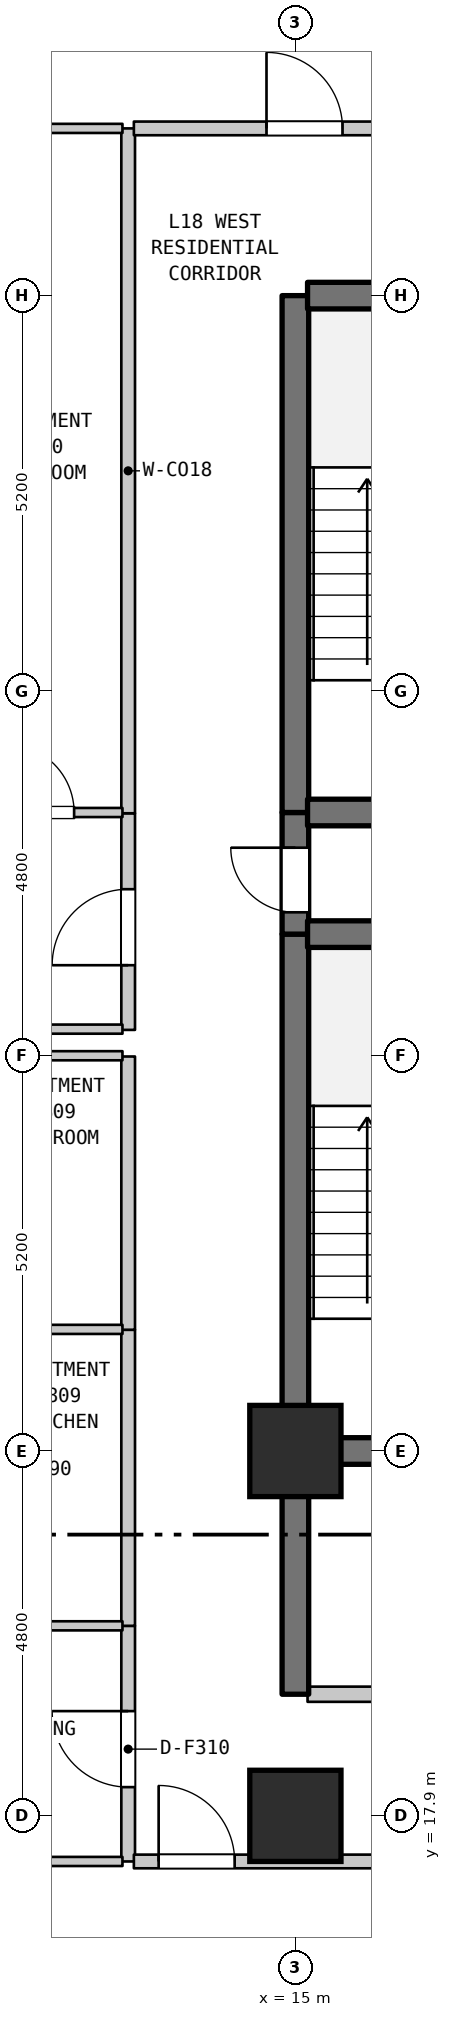
"""IFC4 building model, lengths in metres.
Left out: names, types, materials, properties, quantities, classifications, styles, units other than length and angle.
Written with IfcOpenShell. Run it as: python <this file> out.ifc"""

import sys

from ifc_helpers import new_model, si_unit, direction, frame, frame_2d, origin, origin_2d, place, context, subcontext, project, spatial, rectangle, extrude, element, fill, save


model = new_model("IFC4")
c1 = context("Model", 3, precision=1e-05, world=origin(), true_north=direction((0.0, 1.0)))
c2 = subcontext(c1, "Body", "Model", "MODEL_VIEW")
j1 = project(units=[si_unit("LENGTHUNIT", "METRE"), si_unit("PLANEANGLEUNIT", "RADIAN")], contexts=[c1])
p1 = place(None, origin())
s1 = spatial("IfcSite", under=j1, at=p1, CompositionType="ELEMENT")
p2 = place(p1, origin())
s2 = spatial("IfcBuilding", under=s1, at=p2, CompositionType="ELEMENT")
p3 = place(p2, frame((0.0, 0.0, 77.5)))
s3 = spatial("IfcBuildingStorey", under=s2, at=p3, CompositionType="ELEMENT", Elevation=77.5)
for number, where, z_axis, x_axis in (
    (1, (15.0, 17.9, 0.0), (0.0, 0.0, 1.0), (1.0, 0.0, 0.0)),
    (2, (15.0, 22.7, 0.0), (0.0, 0.0, 1.0), (1.0, 0.0, 0.0)),
):
    element("IfcColumn", number, at=place(p3, frame(where, z_axis=z_axis, x_axis=x_axis)), inside=s3, PredefinedType="COLUMN", context=c2, shape_type="SweptSolid", body=[
        extrude(rectangle(XDim=1.2, YDim=1.2, at=origin_2d()), origin(), (0.0, 0.0, 1.0), 3.7),
    ])
p4 = place(p3, frame((12.8, 17.3, 0.0), z_axis=(0.0, 0.0, 1.0), x_axis=(0.0, 1.0, 0.0)))
e3 = element("IfcWall", 3, at=p4, inside=s3, PredefinedType="STANDARD", context=c2, shape_type="SweptSolid", body=[
    extrude(rectangle(XDim=3.1, YDim=0.18, at=frame_2d((1.55, 0.0))), origin(), (0.0, 0.0, 1.0), 3.28),
])
p5 = place(p4, frame((0.978, 0.0, 0.0)))
e4 = element("IfcOpeningElement", 4, at=p5, cuts=e3, PredefinedType="OPENING", context=c2, shape_type="SweptSolid", body=[
    extrude(rectangle(XDim=1.0, YDim=2.15, at=frame_2d((0.5, 1.075))), frame((0.0, 0.1, 0.0), z_axis=(0.0, -1.0, 0.0), x_axis=(1.0, 0.0, 0.0)), (0.0, 0.0, 1.0), 0.2),
])
p6 = place(p3, frame((12.8, 20.4, 0.0), z_axis=(0.0, 0.0, 1.0), x_axis=(0.0, 1.0, 0.0)))
e5 = element("IfcWall", 5, at=p6, inside=s3, PredefinedType="STANDARD", context=c2, shape_type="SweptSolid", body=[
    extrude(rectangle(XDim=3.895, YDim=0.18, at=frame_2d((1.948, 0.0))), origin(), (0.0, 0.0, 1.0), 3.28),
])
p7 = place(p3, frame((12.8, 24.295, 0.0), z_axis=(0.0, 0.0, 1.0), x_axis=(0.0, 1.0, 0.0)))
e6 = element("IfcWall", 6, at=p7, inside=s3, PredefinedType="STANDARD", context=c2, shape_type="SweptSolid", body=[
    extrude(rectangle(XDim=3.595, YDim=0.18, at=frame_2d((1.797, 0.0))), origin(), (0.0, 0.0, 1.0), 3.28),
])
p8 = place(p3, frame((12.8, 28.24, 0.0), z_axis=(0.0, 0.0, 1.0), x_axis=(0.0, 1.0, 0.0)))
e7 = element("IfcWall", 7, at=p8, inside=s3, PredefinedType="STANDARD", context=c2, shape_type="SweptSolid", body=[
    extrude(rectangle(XDim=2.85, YDim=0.18, at=frame_2d((1.425, 0.0))), origin(), (0.0, 0.0, 1.0), 3.28),
])
p9 = place(p8, frame((0.851, 0.0, 0.0)))
e8 = element("IfcOpeningElement", 8, at=p9, cuts=e7, PredefinedType="OPENING", context=c2, shape_type="SweptSolid", body=[
    extrude(rectangle(XDim=1.0, YDim=2.15, at=frame_2d((0.5, 1.075))), frame((0.0, 0.1, 0.0), z_axis=(0.0, -1.0, 0.0), x_axis=(1.0, 0.0, 0.0)), (0.0, 0.0, 1.0), 0.2),
])
p10 = place(p3, frame((12.8, 31.09, 0.0), z_axis=(0.0, 0.0, 1.0), x_axis=(0.0, 1.0, 0.0)))
e9 = element("IfcWall", 9, at=p10, inside=s3, PredefinedType="STANDARD", context=c2, shape_type="SweptSolid", body=[
    extrude(rectangle(XDim=9.01, YDim=0.18, at=frame_2d((4.505, 0.0))), origin(), (0.0, 0.0, 1.0), 3.28),
])
p11 = place(p3, frame((15.0, 19.5, 0.0), z_axis=(0.0, 0.0, 1.0), x_axis=(0.0, 1.0, 0.0)))
e10 = element("IfcWall", 10, at=p11, inside=s3, PredefinedType="SHEAR", context=c2, shape_type="SweptSolid", body=[
    extrude(rectangle(XDim=3.2, YDim=0.35, at=frame_2d((1.6, 0.0))), origin(), (0.0, 0.0, 1.0), 3.28),
])
p12 = place(p3, frame((15.0, 22.7, 0.0), z_axis=(0.0, 0.0, 1.0), x_axis=(0.0, 1.0, 0.0)))
e11 = element("IfcWall", 11, at=p12, inside=s3, PredefinedType="SHEAR", context=c2, shape_type="SweptSolid", body=[
    extrude(rectangle(XDim=6.8, YDim=0.35, at=frame_2d((3.4, 0.0))), origin(), (0.0, 0.0, 1.0), 3.28),
])
p13 = place(p3, frame((15.0, 29.5, 0.0), z_axis=(0.0, 0.0, 1.0), x_axis=(0.0, 1.0, 0.0)))
e12 = element("IfcWall", 12, at=p13, inside=s3, PredefinedType="SHEAR", context=c2, shape_type="SweptSolid", body=[
    extrude(rectangle(XDim=1.6, YDim=0.35, at=frame_2d((0.8, 0.0))), origin(), (0.0, 0.0, 1.0), 3.28),
])
p14 = place(p13, frame((0.287, 0.0, 0.0)))
e13 = element("IfcOpeningElement", 13, at=p14, cuts=e12, PredefinedType="OPENING", context=c2, shape_type="SweptSolid", body=[
    extrude(rectangle(XDim=0.85, YDim=2.1, at=frame_2d((0.425, 1.05))), frame((0.0, 0.185, 0.0), z_axis=(0.0, -1.0, 0.0), x_axis=(1.0, 0.0, 0.0)), (0.0, 0.0, 1.0), 0.37),
])
p15 = place(p3, frame((15.0, 31.1, 0.0), z_axis=(0.0, 0.0, 1.0), x_axis=(0.0, 1.0, 0.0)))
e14 = element("IfcWall", 14, at=p15, inside=s3, PredefinedType="SHEAR", context=c2, shape_type="SweptSolid", body=[
    extrude(rectangle(XDim=6.8, YDim=0.35, at=frame_2d((3.4, 0.0))), origin(), (0.0, 0.0, 1.0), 3.28),
])
p16 = place(p3, frame((9.085, 17.3, 0.0), z_axis=(0.0, 0.0, 1.0), x_axis=(1.0, 0.0, 0.0)))
e15 = element("IfcWall", 15, at=p16, inside=s3, PredefinedType="PARTITIONING", context=c2, shape_type="SweptSolid", body=[
    extrude(rectangle(XDim=3.64, YDim=0.12, at=frame_2d((1.82, 0.0))), origin(), (0.0, 0.0, 1.0), 3.28),
])
p17 = place(p3, frame((12.875, 17.3, 0.0), z_axis=(0.0, 0.0, 1.0), x_axis=(1.0, 0.0, 0.0)))
e16 = element("IfcWall", 16, at=p17, inside=s3, PredefinedType="STANDARD", context=c2, shape_type="SweptSolid", body=[
    extrude(rectangle(XDim=3.28, YDim=0.18, at=frame_2d((1.64, 0.0))), origin(), (0.0, 0.0, 1.0), 3.28),
])
p18 = place(p17, frame((0.326, 0.0, 0.0)))
e17 = element("IfcOpeningElement", 17, at=p18, cuts=e16, PredefinedType="OPENING", context=c2, shape_type="SweptSolid", body=[
    extrude(rectangle(XDim=1.0, YDim=2.15, at=frame_2d((0.5, 1.075))), frame((0.0, 0.1, 0.0), z_axis=(0.0, -1.0, 0.0), x_axis=(1.0, 0.0, 0.0)), (0.0, 0.0, 1.0), 0.2),
])
p19 = place(p3, frame((15.16, 19.5, 0.0), z_axis=(0.0, 0.0, 1.0), x_axis=(1.0, 0.0, 0.0)))
e18 = element("IfcWall", 18, at=p19, inside=s3, PredefinedType="STANDARD", context=c2, shape_type="SweptSolid", body=[
    extrude(rectangle(XDim=3.68, YDim=0.2, at=frame_2d((1.84, 0.0))), origin(), (0.0, 0.0, 1.0), 3.28),
])
p20 = place(p19, frame((1.39, 0.0, 0.0)))
e19 = element("IfcOpeningElement", 19, at=p20, cuts=e18, PredefinedType="OPENING", context=c2, shape_type="SweptSolid", body=[
    extrude(rectangle(XDim=0.9, YDim=2.15, at=frame_2d((0.45, 1.075))), frame((0.0, 0.11, 0.0), z_axis=(0.0, -1.0, 0.0), x_axis=(1.0, 0.0, 0.0)), (0.0, 0.0, 1.0), 0.22),
])
p21 = place(p3, frame((10.595, 20.4, 0.0), z_axis=(0.0, 0.0, 1.0), x_axis=(1.0, 0.0, 0.0)))
e20 = element("IfcWall", 20, at=p21, inside=s3, PredefinedType="PARTITIONING", context=c2, shape_type="SweptSolid", body=[
    extrude(rectangle(XDim=2.13, YDim=0.12, at=frame_2d((1.065, 0.0))), origin(), (0.0, 0.0, 1.0), 3.28),
])
p22 = place(p3, frame((15.16, 22.7, 0.0), z_axis=(0.0, 0.0, 1.0), x_axis=(1.0, 0.0, 0.0)))
e21 = element("IfcWall", 21, at=p22, inside=s3, PredefinedType="SHEAR", context=c2, shape_type="SweptSolid", body=[
    extrude(rectangle(XDim=3.68, YDim=0.35, at=frame_2d((1.84, 0.0))), origin(), (0.0, 0.0, 1.0), 3.28),
])
for number, where, z_axis, x_axis in (
    (22, (10.595, 24.3, 0.0), (0.0, 0.0, 1.0), (1.0, 0.0, 0.0)),
    (23, (10.595, 27.9, 0.0), (0.0, 0.0, 1.0), (1.0, 0.0, 0.0)),
):
    element("IfcWall", number, at=place(p3, frame(where, z_axis=z_axis, x_axis=x_axis)), inside=s3, PredefinedType="PARTITIONING", context=c2, shape_type="SweptSolid", body=[
        extrude(rectangle(XDim=2.13, YDim=0.12, at=frame_2d((1.065, 0.0))), origin(), (0.0, 0.0, 1.0), 3.28),
    ])
p23 = place(p3, frame((9.03, 28.25, 0.0), z_axis=(0.0, 0.0, 1.0), x_axis=(1.0, 0.0, 0.0)))
e24 = element("IfcWall", 24, at=p23, inside=s3, PredefinedType="PARTITIONING", context=c2, shape_type="SweptSolid", body=[
    extrude(rectangle(XDim=3.695, YDim=0.12, at=frame_2d((1.848, 0.0))), origin(), (0.0, 0.0, 1.0), 3.28),
])
p24 = place(p3, frame((15.16, 29.5, 0.0), z_axis=(0.0, 0.0, 1.0), x_axis=(1.0, 0.0, 0.0)))
e25 = element("IfcWall", 25, at=p24, inside=s3, PredefinedType="SHEAR", context=c2, shape_type="SweptSolid", body=[
    extrude(rectangle(XDim=3.68, YDim=0.35, at=frame_2d((1.84, 0.0))), origin(), (0.0, 0.0, 1.0), 3.28),
])
p25 = place(p3, frame((10.523, 31.1, 0.0), z_axis=(0.0, 0.0, 1.0), x_axis=(1.0, 0.0, 0.0)))
e26 = element("IfcWall", 26, at=p25, inside=s3, PredefinedType="PARTITIONING", context=c2, shape_type="SweptSolid", body=[
    extrude(rectangle(XDim=2.202, YDim=0.12, at=frame_2d((1.101, 0.0))), origin(), (0.0, 0.0, 1.0), 3.28),
])
p26 = place(p25, frame((0.666, 0.0, 0.0)))
e27 = element("IfcOpeningElement", 27, at=p26, cuts=e26, PredefinedType="OPENING", context=c2, shape_type="SweptSolid", body=[
    extrude(rectangle(XDim=0.9, YDim=2.1, at=frame_2d((0.45, 1.05))), frame((0.0, 0.07, 0.0), z_axis=(0.0, -1.0, 0.0), x_axis=(1.0, 0.0, 0.0)), (0.0, 0.0, 1.0), 0.14),
])
for number, where, z_axis, x_axis in (
    (28, (15.16, 31.1, 0.0), (0.0, 0.0, 1.0), (1.0, 0.0, 0.0)),
    (29, (15.16, 37.9, 0.0), (0.0, 0.0, 1.0), (1.0, 0.0, 0.0)),
):
    element("IfcWall", number, at=place(p3, frame(where, z_axis=z_axis, x_axis=x_axis)), inside=s3, PredefinedType="SHEAR", context=c2, shape_type="SweptSolid", body=[
        extrude(rectangle(XDim=3.68, YDim=0.35, at=frame_2d((1.84, 0.0))), origin(), (0.0, 0.0, 1.0), 3.28),
    ])
p27 = place(p3, frame((10.523, 40.1, 0.0), z_axis=(0.0, 0.0, 1.0), x_axis=(1.0, 0.0, 0.0)))
e30 = element("IfcWall", 30, at=p27, inside=s3, PredefinedType="PARTITIONING", context=c2, shape_type="SweptSolid", body=[
    extrude(rectangle(XDim=2.202, YDim=0.12, at=frame_2d((1.101, 0.0))), origin(), (0.0, 0.0, 1.0), 3.28),
])
p28 = place(p3, frame((12.875, 40.1, 0.0), z_axis=(0.0, 0.0, 1.0), x_axis=(1.0, 0.0, 0.0)))
e31 = element("IfcWall", 31, at=p28, inside=s3, PredefinedType="STANDARD", context=c2, shape_type="SweptSolid", body=[
    extrude(rectangle(XDim=4.52, YDim=0.18, at=frame_2d((2.26, 0.0))), origin(), (0.0, 0.0, 1.0), 3.28),
])
p29 = place(p28, frame((1.745, 0.0, 0.0)))
e32 = element("IfcOpeningElement", 32, at=p29, cuts=e31, PredefinedType="OPENING", context=c2, shape_type="SweptSolid", body=[
    extrude(rectangle(XDim=1.0, YDim=2.15, at=frame_2d((0.5, 1.075))), frame((0.0, 0.1, 0.0), z_axis=(0.0, -1.0, 0.0), x_axis=(1.0, 0.0, 0.0)), (0.0, 0.0, 1.0), 0.2),
])
p30 = place(p5, origin())
e33 = element("IfcDoor", 33, at=p30, inside=s3, OperationType="SINGLE_SWING_RIGHT", PredefinedType="DOOR", context=c2, shape_type="SweptSolid", body=[
    extrude(rectangle(XDim=1.0, YDim=2.15, at=frame_2d((0.5, 1.075))), frame((0.0, 0.025, 0.0), z_axis=(0.0, -1.0, 0.0), x_axis=(1.0, 0.0, 0.0)), (0.0, 0.0, 1.0), 0.05),
])
fill(e4, e33)
p31 = place(p9, origin())
e34 = element("IfcDoor", 34, at=p31, inside=s3, OperationType="SINGLE_SWING_LEFT", PredefinedType="DOOR", context=c2, shape_type="SweptSolid", body=[
    extrude(rectangle(XDim=1.0, YDim=2.15, at=frame_2d((0.5, 1.075))), frame((0.0, 0.025, 0.0), z_axis=(0.0, -1.0, 0.0), x_axis=(1.0, 0.0, 0.0)), (0.0, 0.0, 1.0), 0.05),
])
fill(e8, e34)
p32 = place(p14, origin())
e35 = element("IfcDoor", 35, at=p32, inside=s3, OperationType="SINGLE_SWING_RIGHT", PredefinedType="DOOR", context=c2, shape_type="SweptSolid", body=[
    extrude(rectangle(XDim=0.85, YDim=2.1, at=frame_2d((0.425, 1.05))), frame((0.0, 0.025, 0.0), z_axis=(0.0, -1.0, 0.0), x_axis=(1.0, 0.0, 0.0)), (0.0, 0.0, 1.0), 0.05),
])
fill(e13, e35)
p33 = place(p18, origin())
e36 = element("IfcDoor", 36, at=p33, inside=s3, OperationType="SINGLE_SWING_LEFT", PredefinedType="DOOR", context=c2, shape_type="SweptSolid", body=[
    extrude(rectangle(XDim=1.0, YDim=2.15, at=frame_2d((0.5, 1.075))), frame((0.0, 0.025, 0.0), z_axis=(0.0, -1.0, 0.0), x_axis=(1.0, 0.0, 0.0)), (0.0, 0.0, 1.0), 0.05),
])
fill(e17, e36)
p34 = place(p26, origin())
e37 = element("IfcDoor", 37, at=p34, inside=s3, OperationType="SINGLE_SWING_LEFT", PredefinedType="DOOR", context=c2, shape_type="SweptSolid", body=[
    extrude(rectangle(XDim=0.9, YDim=2.1, at=frame_2d((0.45, 1.05))), frame((0.0, 0.025, 0.0), z_axis=(0.0, -1.0, 0.0), x_axis=(1.0, 0.0, 0.0)), (0.0, 0.0, 1.0), 0.05),
])
fill(e27, e37)
p35 = place(p29, origin())
e38 = element("IfcDoor", 38, at=p35, inside=s3, OperationType="SINGLE_SWING_LEFT", PredefinedType="DOOR", context=c2, shape_type="SweptSolid", body=[
    extrude(rectangle(XDim=1.0, YDim=2.15, at=frame_2d((0.5, 1.075))), frame((0.0, 0.025, 0.0), z_axis=(0.0, -1.0, 0.0), x_axis=(1.0, 0.0, 0.0)), (0.0, 0.0, 1.0), 0.05),
])
fill(e32, e38)
save(model, sys.argv[1])
